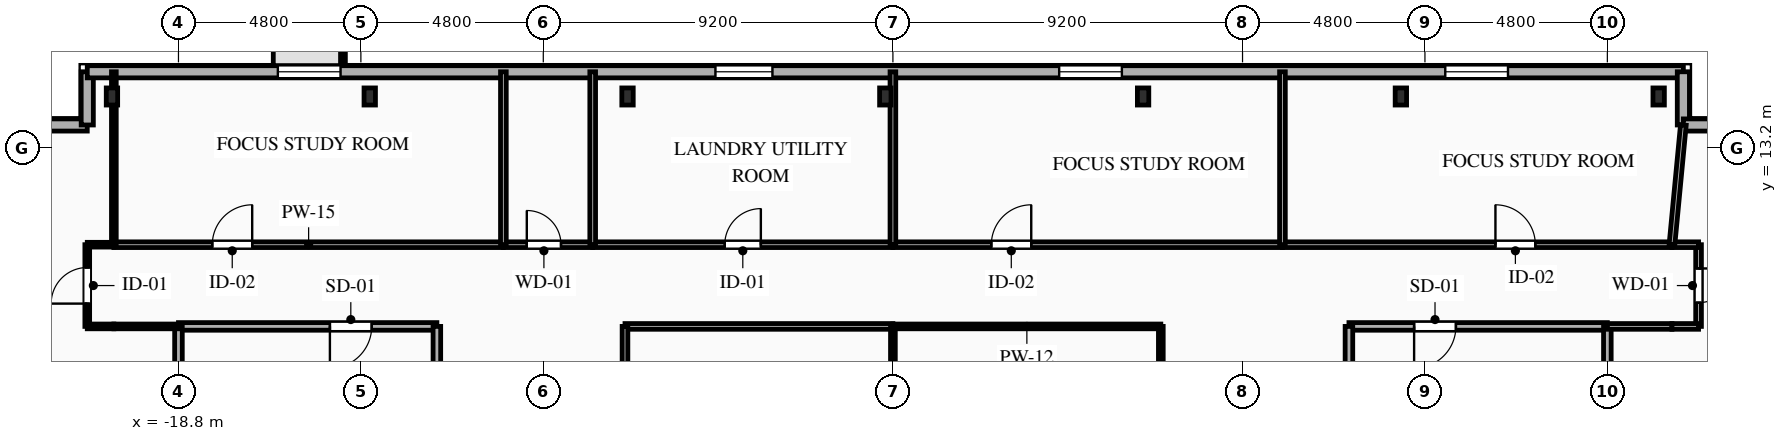
"""IFC4 building model, lengths in metres.
Left out: names, types, materials, properties, quantities, classifications, styles, units other than length and angle.
Written with IfcOpenShell. Run it as: python <this file> out.ifc"""

import sys

from ifc_helpers import new_model, si_unit, direction, frame, frame_2d, origin, origin_2d, place, context, subcontext, project, spatial, rectangle, i_section, extrude, element, fill, save


model = new_model("IFC4")
c1 = context("Model", 3, precision=1e-05, world=origin(), true_north=direction((0.0, 1.0)))
c2 = subcontext(c1, "Body", "Model", "MODEL_VIEW")
j1 = project(units=[si_unit("LENGTHUNIT", "METRE"), si_unit("PLANEANGLEUNIT", "RADIAN")], contexts=[c1])
p1 = place(None, origin())
s1 = spatial("IfcSite", under=j1, at=p1, CompositionType="ELEMENT")
p2 = place(p1, origin())
s2 = spatial("IfcBuilding", under=s1, at=p2, CompositionType="ELEMENT")
p3 = place(p2, frame((0.0, 0.0, 235.0)))
s3 = spatial("IfcBuildingStorey", under=s2, at=p3, CompositionType="ELEMENT", Elevation=235.0)
for number, where, z_axis, x_axis in (
    (1, (20.15, 14.55, 0.0), (0.0, 0.0, 1.0), (1.0, 0.0, 0.0)),
    (2, (13.367, 14.55, 0.0), (0.0, 0.0, 1.0), (1.0, 0.0, 0.0)),
    (3, (6.583, 14.55, 0.0), (0.0, 0.0, 1.0), (1.0, 0.0, 0.0)),
    (4, (-0.2, 14.55, 0.0), (0.0, 0.0, 1.0), (1.0, 0.0, 0.0)),
    (5, (-6.983, 14.55, 0.0), (0.0, 0.0, 1.0), (1.0, 0.0, 0.0)),
    (6, (-13.767, 14.55, 0.0), (0.0, 0.0, 1.0), (1.0, 0.0, 0.0)),
    (7, (-20.55, 14.55, 0.0), (0.0, 0.0, 1.0), (1.0, 0.0, 0.0)),
):
    element("IfcColumn", number, at=place(p3, frame(where, z_axis=z_axis, x_axis=x_axis)), inside=s3, PredefinedType="COLUMN", context=c2, shape_type="SweptSolid", body=[
        extrude(i_section(OverallWidth=0.3, OverallDepth=0.45, WebThickness=0.014, FlangeThickness=0.026, FilletRadius=0.027, at=origin_2d()), origin(), (0.0, 0.0, 1.0), 3.35),
    ])
p4 = place(p3, frame((-22.6, 13.8, 0.0), z_axis=(0.0, 0.0, 1.0), x_axis=(1.0, 0.0, 0.0)))
e8 = element("IfcWall", 8, at=p4, inside=s3, PredefinedType="SOLIDWALL", context=c2, shape_type="SweptSolid", body=[
    extrude(rectangle(XDim=1.4, YDim=0.32, at=frame_2d((0.7, 0.0))), origin(), (0.0, 0.0, 1.0), 3.04),
])
p5 = place(p3, frame((-21.2, 13.8, 0.0), z_axis=(0.0, 0.0, 1.0), x_axis=(0.0, 1.0, 0.0)))
e9 = element("IfcWall", 9, at=p5, inside=s3, PredefinedType="SOLIDWALL", context=c2, shape_type="SweptSolid", body=[
    extrude(rectangle(XDim=1.4, YDim=0.32, at=frame_2d((0.7, 0.0))), origin(), (0.0, 0.0, 1.0), 3.04),
])
p6 = place(p3, frame((-21.2, 15.2, 0.0), z_axis=(0.0, 0.0, 1.0), x_axis=(1.0, 0.0, 0.0)))
e10 = element("IfcWall", 10, at=p6, inside=s3, PredefinedType="SOLIDWALL", context=c2, shape_type="SweptSolid", body=[
    extrude(rectangle(XDim=42.0, YDim=0.32, at=frame_2d((21.0, 0.0))), origin(), (0.0, 0.0, 1.0), 3.04),
])
p7 = place(p6, frame((5.015, 0.0, 0.85)))
e11 = element("IfcOpeningElement", 11, at=p7, cuts=e10, PredefinedType="OPENING", context=c2, shape_type="SweptSolid", body=[
    extrude(rectangle(XDim=1.65, YDim=1.85, at=frame_2d((0.825, 0.925))), frame((0.0, 0.17, 0.0), z_axis=(0.0, -1.0, 0.0), x_axis=(1.0, 0.0, 0.0)), (0.0, 0.0, 1.0), 0.34),
])
p8 = place(p6, frame((16.53, 0.0, 0.85)))
e12 = element("IfcOpeningElement", 12, at=p8, cuts=e10, PredefinedType="OPENING", context=c2, shape_type="SweptSolid", body=[
    extrude(rectangle(XDim=1.5, YDim=1.85, at=frame_2d((0.75, 0.925))), frame((0.0, 0.17, 0.0), z_axis=(0.0, -1.0, 0.0), x_axis=(1.0, 0.0, 0.0)), (0.0, 0.0, 1.0), 0.34),
])
p9 = place(p6, frame((25.575, 0.0, 0.85)))
e13 = element("IfcOpeningElement", 13, at=p9, cuts=e10, PredefinedType="OPENING", context=c2, shape_type="SweptSolid", body=[
    extrude(rectangle(XDim=1.65, YDim=1.85, at=frame_2d((0.825, 0.925))), frame((0.0, 0.17, 0.0), z_axis=(0.0, -1.0, 0.0), x_axis=(1.0, 0.0, 0.0)), (0.0, 0.0, 1.0), 0.34),
])
p10 = place(p6, frame((35.735, 0.0, 0.85)))
e14 = element("IfcOpeningElement", 14, at=p10, cuts=e10, PredefinedType="OPENING", context=c2, shape_type="SweptSolid", body=[
    extrude(rectangle(XDim=1.65, YDim=1.85, at=frame_2d((0.825, 0.925))), frame((0.0, 0.17, 0.0), z_axis=(0.0, -1.0, 0.0), x_axis=(1.0, 0.0, 0.0)), (0.0, 0.0, 1.0), 0.34),
])
for number, where, z_axis, x_axis in (
    (15, (20.8, 15.2, 0.0), (0.0, 0.0, 1.0), (0.0, -1.0, 0.0)),
    (16, (20.8, 13.8, 0.0), (0.0, 0.0, 1.0), (1.0, 0.0, 0.0)),
):
    element("IfcWall", number, at=place(p3, frame(where, z_axis=z_axis, x_axis=x_axis)), inside=s3, PredefinedType="SOLIDWALL", context=c2, shape_type="SweptSolid", body=[
        extrude(rectangle(XDim=1.4, YDim=0.32, at=frame_2d((0.7, 0.0))), origin(), (0.0, 0.0, 1.0), 3.04),
    ])
p11 = place(p3, frame((-12.0, 8.5, 0.0), z_axis=(0.0, 0.0, 1.0), x_axis=(-1.0, 0.0, 0.0)))
e17 = element("IfcWall", 17, at=p11, inside=s3, PredefinedType="PARTITIONING", context=c2, shape_type="SweptSolid", body=[
    extrude(rectangle(XDim=6.8, YDim=0.2, at=frame_2d((3.4, 0.0))), origin(), (0.0, 0.0, 1.0), 3.04),
])
p12 = place(p11, frame((1.715, 0.0, 0.0)))
e18 = element("IfcOpeningElement", 18, at=p12, cuts=e17, PredefinedType="OPENING", context=c2, shape_type="SweptSolid", body=[
    extrude(rectangle(XDim=1.1, YDim=2.15, at=frame_2d((0.55, 1.075))), frame((0.0, 0.11, 0.0), z_axis=(0.0, -1.0, 0.0), x_axis=(1.0, 0.0, 0.0)), (0.0, 0.0, 1.0), 0.22),
])
p13 = place(p3, frame((-12.0, 5.6, 0.0), z_axis=(0.0, 0.0, 1.0), x_axis=(0.0, 1.0, 0.0)))
e19 = element("IfcWall", 19, at=p13, inside=s3, PredefinedType="PARTITIONING", context=c2, shape_type="SweptSolid", body=[
    extrude(rectangle(XDim=2.9, YDim=0.2, at=frame_2d((1.45, 0.0))), origin(), (0.0, 0.0, 1.0), 3.04),
])
p14 = place(p3, frame((-18.8, 8.5, 0.0), z_axis=(0.0, 0.0, 1.0), x_axis=(0.0, -1.0, 0.0)))
e20 = element("IfcWall", 20, at=p14, inside=s3, PredefinedType="PARTITIONING", context=c2, shape_type="SweptSolid", body=[
    extrude(rectangle(XDim=2.9, YDim=0.2, at=frame_2d((1.45, 0.0))), origin(), (0.0, 0.0, 1.0), 2.665),
])
p15 = place(p3, frame((18.8, 8.5, 0.0), z_axis=(0.0, 0.0, 1.0), x_axis=(-1.0, 0.0, 0.0)))
e21 = element("IfcWall", 21, at=p15, inside=s3, PredefinedType="PARTITIONING", context=c2, shape_type="SweptSolid", body=[
    extrude(rectangle(XDim=6.8, YDim=0.2, at=frame_2d((3.4, 0.0))), origin(), (0.0, 0.0, 1.0), 3.04),
])
p16 = place(p15, frame((3.985, 0.0, 0.0)))
e22 = element("IfcOpeningElement", 22, at=p16, cuts=e21, PredefinedType="OPENING", context=c2, shape_type="SweptSolid", body=[
    extrude(rectangle(XDim=1.1, YDim=2.15, at=frame_2d((0.55, 1.075))), frame((0.0, 0.11, 0.0), z_axis=(0.0, -1.0, 0.0), x_axis=(1.0, 0.0, 0.0)), (0.0, 0.0, 1.0), 0.22),
])
p17 = place(p3, frame((12.0, 8.5, 0.0), z_axis=(0.0, 0.0, 1.0), x_axis=(0.0, -1.0, 0.0)))
e23 = element("IfcWall", 23, at=p17, inside=s3, PredefinedType="PARTITIONING", context=c2, shape_type="SweptSolid", body=[
    extrude(rectangle(XDim=2.9, YDim=0.2, at=frame_2d((1.45, 0.0))), origin(), (0.0, 0.0, 1.0), 3.04),
])
p18 = place(p3, frame((18.8, 5.6, 0.0), z_axis=(0.0, 0.0, 1.0), x_axis=(0.0, 1.0, 0.0)))
e24 = element("IfcWall", 24, at=p18, inside=s3, PredefinedType="PARTITIONING", context=c2, shape_type="SweptSolid", body=[
    extrude(rectangle(XDim=2.9, YDim=0.2, at=frame_2d((1.45, 0.0))), origin(), (0.0, 0.0, 1.0), 2.665),
])
p19 = place(p3, frame((-21.2, 8.5, 0.0), z_axis=(0.0, 0.0, 1.0), x_axis=(0.0, 1.0, 0.0)))
e25 = element("IfcWall", 25, at=p19, inside=s3, PredefinedType="PARTITIONING", context=c2, shape_type="SweptSolid", body=[
    extrude(rectangle(XDim=2.15, YDim=0.125, at=frame_2d((1.075, 0.0))), origin(), (0.0, 0.0, 1.0), 2.695),
])
p20 = place(p19, frame((0.6, 0.0, 0.0)))
e26 = element("IfcOpeningElement", 26, at=p20, cuts=e25, PredefinedType="OPENING", context=c2, shape_type="SweptSolid", body=[
    extrude(rectangle(XDim=0.95, YDim=2.1, at=frame_2d((0.475, 1.05))), frame((0.0, 0.073, 0.0), z_axis=(0.0, -1.0, 0.0), x_axis=(1.0, 0.0, 0.0)), (0.0, 0.0, 1.0), 0.145),
])
p21 = place(p3, frame((-18.8, 8.5, 0.0), z_axis=(0.0, 0.0, 1.0), x_axis=(-1.0, 0.0, 0.0)))
e27 = element("IfcWall", 27, at=p21, inside=s3, PredefinedType="PARTITIONING", context=c2, shape_type="SweptSolid", body=[
    extrude(rectangle(XDim=1.7, YDim=0.125, at=frame_2d((0.85, 0.0))), origin(), (0.0, 0.0, 1.0), 3.04),
])
for number, where, z_axis, x_axis in (
    (28, (-20.5, 8.5, 0.0), (0.0, 0.0, 1.0), (-1.0, 0.0, 0.0)),
    (29, (-21.2, 10.65, 0.0), (0.0, 0.0, 1.0), (1.0, 0.0, 0.0)),
):
    element("IfcWall", number, at=place(p3, frame(where, z_axis=z_axis, x_axis=x_axis)), inside=s3, PredefinedType="PARTITIONING", context=c2, shape_type="SweptSolid", body=[
        extrude(rectangle(XDim=0.7, YDim=0.125, at=frame_2d((0.35, 0.0))), origin(), (0.0, 0.0, 1.0), 3.04),
    ])
p22 = place(p3, frame((-20.5, 10.65, 0.0), z_axis=(0.0, 0.0, 1.0), x_axis=(1.0, 0.0, 0.0)))
e30 = element("IfcWall", 30, at=p22, inside=s3, PredefinedType="PARTITIONING", context=c2, shape_type="SweptSolid", body=[
    extrude(rectangle(XDim=10.25, YDim=0.15, at=frame_2d((5.125, 0.0))), origin(), (0.0, 0.0, 1.0), 3.04),
])
p23 = place(p22, frame((2.59, 0.0, 0.0)))
e31 = element("IfcOpeningElement", 31, at=p23, cuts=e30, PredefinedType="OPENING", context=c2, shape_type="SweptSolid", body=[
    extrude(rectangle(XDim=1.05, YDim=2.15, at=frame_2d((0.525, 1.075))), frame((0.0, 0.085, 0.0), z_axis=(0.0, -1.0, 0.0), x_axis=(1.0, 0.0, 0.0)), (0.0, 0.0, 1.0), 0.17),
])
p24 = place(p3, frame((-10.25, 10.65, 0.0), z_axis=(0.0, 0.0, 1.0), x_axis=(1.0, 0.0, 0.0)))
e32 = element("IfcWall", 32, at=p24, inside=s3, PredefinedType="PLUMBINGWALL", context=c2, shape_type="SweptSolid", body=[
    extrude(rectangle(XDim=2.35, YDim=0.15, at=frame_2d((1.175, 0.0))), origin(), (0.0, 0.0, 1.0), 3.04),
])
p25 = place(p24, frame((0.616, 0.0, 0.0)))
e33 = element("IfcOpeningElement", 33, at=p25, cuts=e32, PredefinedType="OPENING", context=c2, shape_type="SweptSolid", body=[
    extrude(rectangle(XDim=0.9, YDim=2.1, at=frame_2d((0.45, 1.05))), frame((0.0, 0.085, 0.0), z_axis=(0.0, -1.0, 0.0), x_axis=(1.0, 0.0, 0.0)), (0.0, 0.0, 1.0), 0.17),
])
p26 = place(p3, frame((-7.9, 10.65, 0.0), z_axis=(0.0, 0.0, 1.0), x_axis=(1.0, 0.0, 0.0)))
e34 = element("IfcWall", 34, at=p26, inside=s3, PredefinedType="PARTITIONING", context=c2, shape_type="SweptSolid", body=[
    extrude(rectangle(XDim=7.9, YDim=0.15, at=frame_2d((3.95, 0.0))), origin(), (0.0, 0.0, 1.0), 3.04),
])
p27 = place(p26, frame((3.475, 0.0, 0.0)))
e35 = element("IfcOpeningElement", 35, at=p27, cuts=e34, PredefinedType="OPENING", context=c2, shape_type="SweptSolid", body=[
    extrude(rectangle(XDim=0.95, YDim=2.1, at=frame_2d((0.475, 1.05))), frame((0.0, 0.085, 0.0), z_axis=(0.0, -1.0, 0.0), x_axis=(1.0, 0.0, 0.0)), (0.0, 0.0, 1.0), 0.17),
])
p28 = place(p3, frame((0.0, 8.5, 0.0), z_axis=(0.0, 0.0, 1.0), x_axis=(-1.0, 0.0, 0.0)))
e36 = element("IfcWall", 36, at=p28, inside=s3, PredefinedType="PARTITIONING", context=c2, shape_type="SweptSolid", body=[
    extrude(rectangle(XDim=7.05, YDim=0.15, at=frame_2d((3.525, 0.0))), origin(), (0.0, 0.0, 1.0), 3.04),
])
p29 = place(p3, frame((21.2, 10.65, 0.0), z_axis=(0.0, 0.0, 1.0), x_axis=(0.0, -1.0, 0.0)))
e37 = element("IfcWall", 37, at=p29, inside=s3, PredefinedType="PARTITIONING", context=c2, shape_type="SweptSolid", body=[
    extrude(rectangle(XDim=2.15, YDim=0.15, at=frame_2d((1.075, 0.0))), origin(), (0.0, 0.0, 1.0), 3.04),
])
p30 = place(p29, frame((0.625, 0.0, 0.0)))
e38 = element("IfcOpeningElement", 38, at=p30, cuts=e37, PredefinedType="OPENING", context=c2, shape_type="SweptSolid", body=[
    extrude(rectangle(XDim=0.9, YDim=2.1, at=frame_2d((0.45, 1.05))), frame((0.0, 0.085, 0.0), z_axis=(0.0, -1.0, 0.0), x_axis=(1.0, 0.0, 0.0)), (0.0, 0.0, 1.0), 0.17),
])
p31 = place(p3, frame((20.5, 8.5, 0.0), z_axis=(0.0, 0.0, 1.0), x_axis=(-1.0, 0.0, 0.0)))
e39 = element("IfcWall", 39, at=p31, inside=s3, PredefinedType="PARTITIONING", context=c2, shape_type="SweptSolid", body=[
    extrude(rectangle(XDim=1.7, YDim=0.15, at=frame_2d((0.85, 0.0))), origin(), (0.0, 0.0, 1.0), 3.04),
])
for number, where, z_axis, x_axis in (
    (40, (20.5, 10.65, 0.0), (0.0, 0.0, 1.0), (1.0, 0.0, 0.0)),
    (41, (21.2, 8.5, 0.0), (0.0, 0.0, 1.0), (-1.0, 0.0, 0.0)),
):
    element("IfcWall", number, at=place(p3, frame(where, z_axis=z_axis, x_axis=x_axis)), inside=s3, PredefinedType="PARTITIONING", context=c2, shape_type="SweptSolid", body=[
        extrude(rectangle(XDim=0.7, YDim=0.15, at=frame_2d((0.35, 0.0))), origin(), (0.0, 0.0, 1.0), 3.04),
    ])
p32 = place(p3, frame((0.0, 10.65, 0.0), z_axis=(0.0, 0.0, 1.0), x_axis=(1.0, 0.0, 0.0)))
e42 = element("IfcWall", 42, at=p32, inside=s3, PredefinedType="PARTITIONING", context=c2, shape_type="SweptSolid", body=[
    extrude(rectangle(XDim=10.25, YDim=0.15, at=frame_2d((5.125, 0.0))), origin(), (0.0, 0.0, 1.0), 3.04),
])
p33 = place(p32, frame((2.59, 0.0, 0.0)))
e43 = element("IfcOpeningElement", 43, at=p33, cuts=e42, PredefinedType="OPENING", context=c2, shape_type="SweptSolid", body=[
    extrude(rectangle(XDim=1.05, YDim=2.15, at=frame_2d((0.525, 1.075))), frame((0.0, 0.085, 0.0), z_axis=(0.0, -1.0, 0.0), x_axis=(1.0, 0.0, 0.0)), (0.0, 0.0, 1.0), 0.17),
])
p34 = place(p3, frame((10.25, 10.65, 0.0), z_axis=(0.0, 0.0, 1.0), x_axis=(1.0, 0.0, 0.0)))
e44 = element("IfcWall", 44, at=p34, inside=s3, PredefinedType="PARTITIONING", context=c2, shape_type="SweptSolid", body=[
    extrude(rectangle(XDim=10.25, YDim=0.15, at=frame_2d((5.125, 0.0))), origin(), (0.0, 0.0, 1.0), 3.04),
])
p35 = place(p34, frame((5.605, 0.0, 0.0)))
e45 = element("IfcOpeningElement", 45, at=p35, cuts=e44, PredefinedType="OPENING", context=c2, shape_type="SweptSolid", body=[
    extrude(rectangle(XDim=1.05, YDim=2.15, at=frame_2d((0.525, 1.075))), frame((0.0, 0.085, 0.0), z_axis=(0.0, -1.0, 0.0), x_axis=(1.0, 0.0, 0.0)), (0.0, 0.0, 1.0), 0.17),
])
p36 = place(p3, frame((7.05, 8.5, 0.0), z_axis=(0.0, 0.0, 1.0), x_axis=(-1.0, 0.0, 0.0)))
e46 = element("IfcWall", 46, at=p36, inside=s3, PredefinedType="PARTITIONING", context=c2, shape_type="SweptSolid", body=[
    extrude(rectangle(XDim=7.05, YDim=0.125, at=frame_2d((3.525, 0.0))), origin(), (0.0, 0.0, 1.0), 3.04),
])
p37 = place(p3, frame((-7.05, 8.5, 0.0), z_axis=(0.0, 0.0, 1.0), x_axis=(0.0, -1.0, 0.0)))
e47 = element("IfcWall", 47, at=p37, inside=s3, PredefinedType="PARTITIONING", context=c2, shape_type="SweptSolid", body=[
    extrude(rectangle(XDim=14.1, YDim=0.15, at=frame_2d((7.05, 0.0))), origin(), (0.0, 0.0, 1.0), 3.04),
])
p38 = place(p37, frame((8.074, 0.0, 0.0)))
e48 = element("IfcOpeningElement", 48, at=p38, cuts=e47, PredefinedType="OPENING", context=c2, shape_type="SweptSolid", body=[
    extrude(rectangle(XDim=0.95, YDim=2.1, at=frame_2d((0.475, 1.05))), frame((0.0, 0.085, 0.0), z_axis=(0.0, -1.0, 0.0), x_axis=(1.0, 0.0, 0.0)), (0.0, 0.0, 1.0), 0.17),
])
p39 = place(p3, frame((7.05, -5.6, 0.0), z_axis=(0.0, 0.0, 1.0), x_axis=(0.0, 1.0, 0.0)))
e49 = element("IfcWall", 49, at=p39, inside=s3, PredefinedType="PARTITIONING", context=c2, shape_type="SweptSolid", body=[
    extrude(rectangle(XDim=14.1, YDim=0.125, at=frame_2d((7.05, 0.0))), origin(), (0.0, 0.0, 1.0), 3.04),
])
p40 = place(p39, frame((5.076, 0.0, 0.0)))
e50 = element("IfcOpeningElement", 50, at=p40, cuts=e49, PredefinedType="OPENING", context=c2, shape_type="SweptSolid", body=[
    extrude(rectangle(XDim=0.95, YDim=2.1, at=frame_2d((0.475, 1.05))), frame((0.0, 0.073, 0.0), z_axis=(0.0, -1.0, 0.0), x_axis=(1.0, 0.0, 0.0)), (0.0, 0.0, 1.0), 0.145),
])
p41 = place(p3, frame((-20.5, 15.2, 0.0), z_axis=(0.0, 0.0, 1.0), x_axis=(0.0, -1.0, 0.0)))
e51 = element("IfcWall", 51, at=p41, inside=s3, PredefinedType="PARTITIONING", context=c2, shape_type="SweptSolid", body=[
    extrude(rectangle(XDim=4.55, YDim=0.125, at=frame_2d((2.275, 0.0))), origin(), (0.0, 0.0, 1.0), 2.665),
])
p42 = place(p3, frame((20.5, 10.65, 0.0), z_axis=(0.0, 0.0, 1.0), x_axis=(0.094820015289, 0.99549443228, 0.0)))
e52 = element("IfcWall", 52, at=p42, inside=s3, PredefinedType="PARTITIONING", context=c2, shape_type="SweptSolid", body=[
    extrude(rectangle(XDim=3.164, YDim=0.15, at=frame_2d((1.582, 0.0))), origin(), (0.0, 0.0, 1.0), 3.04),
])
p43 = place(p3, frame((-10.25, 15.2, 0.0), z_axis=(0.0, 0.0, 1.0), x_axis=(0.0, -1.0, 0.0)))
e53 = element("IfcWall", 53, at=p43, inside=s3, PredefinedType="PLUMBINGWALL", context=c2, shape_type="SweptSolid", body=[
    extrude(rectangle(XDim=4.55, YDim=0.15, at=frame_2d((2.275, 0.0))), origin(), (0.0, 0.0, 1.0), 3.04),
])
p44 = place(p3, frame((-7.9, 15.2, 0.0), z_axis=(0.0, 0.0, 1.0), x_axis=(0.0, -1.0, 0.0)))
e54 = element("IfcWall", 54, at=p44, inside=s3, PredefinedType="PLUMBINGWALL", context=c2, shape_type="SweptSolid", body=[
    extrude(rectangle(XDim=4.55, YDim=0.15, at=frame_2d((2.275, 0.0))), origin(), (0.0, 0.0, 1.0), 2.665),
])
for number, where, z_axis, x_axis in (
    (55, (0.0, 15.2, 0.0), (0.0, 0.0, 1.0), (0.0, -1.0, 0.0)),
    (56, (10.25, 15.2, 0.0), (0.0, 0.0, 1.0), (0.0, -1.0, 0.0)),
):
    element("IfcWall", number, at=place(p3, frame(where, z_axis=z_axis, x_axis=x_axis)), inside=s3, PredefinedType="PARTITIONING", context=c2, shape_type="SweptSolid", body=[
        extrude(rectangle(XDim=4.55, YDim=0.15, at=frame_2d((2.275, 0.0))), origin(), (0.0, 0.0, 1.0), 3.04),
    ])
p45 = place(p3, frame((0.0, 8.5, 0.0), z_axis=(0.0, 0.0, 1.0), x_axis=(0.0, -1.0, 0.0)))
e57 = element("IfcWall", 57, at=p45, inside=s3, PredefinedType="PARTITIONING", context=c2, shape_type="SweptSolid", body=[
    extrude(rectangle(XDim=14.1, YDim=0.125, at=frame_2d((7.05, 0.0))), origin(), (0.0, 0.0, 1.0), 3.04),
])
p46 = place(p7, origin())
e58 = element("IfcWindow", 58, at=p46, inside=s3, PartitioningType="SINGLE_PANEL", PredefinedType="WINDOW", context=c2, shape_type="SweptSolid", body=[
    extrude(rectangle(XDim=1.65, YDim=1.85, at=frame_2d((0.825, 0.925))), frame((0.0, 0.03, 0.0), z_axis=(0.0, -1.0, 0.0), x_axis=(1.0, 0.0, 0.0)), (0.0, 0.0, 1.0), 0.06),
])
fill(e11, e58)
p47 = place(p8, origin())
e59 = element("IfcWindow", 59, at=p47, inside=s3, PartitioningType="SINGLE_PANEL", PredefinedType="WINDOW", context=c2, shape_type="SweptSolid", body=[
    extrude(rectangle(XDim=1.5, YDim=1.85, at=frame_2d((0.75, 0.925))), frame((0.0, 0.03, 0.0), z_axis=(0.0, -1.0, 0.0), x_axis=(1.0, 0.0, 0.0)), (0.0, 0.0, 1.0), 0.06),
])
fill(e12, e59)
p48 = place(p9, origin())
e60 = element("IfcWindow", 60, at=p48, inside=s3, PartitioningType="SINGLE_PANEL", PredefinedType="WINDOW", context=c2, shape_type="SweptSolid", body=[
    extrude(rectangle(XDim=1.65, YDim=1.85, at=frame_2d((0.825, 0.925))), frame((0.0, 0.03, 0.0), z_axis=(0.0, -1.0, 0.0), x_axis=(1.0, 0.0, 0.0)), (0.0, 0.0, 1.0), 0.06),
])
fill(e13, e60)
p49 = place(p10, origin())
e61 = element("IfcWindow", 61, at=p49, inside=s3, PartitioningType="SINGLE_PANEL", PredefinedType="WINDOW", context=c2, shape_type="SweptSolid", body=[
    extrude(rectangle(XDim=1.65, YDim=1.85, at=frame_2d((0.825, 0.925))), frame((0.0, 0.03, 0.0), z_axis=(0.0, -1.0, 0.0), x_axis=(1.0, 0.0, 0.0)), (0.0, 0.0, 1.0), 0.06),
])
fill(e14, e61)
p50 = place(p12, origin())
e62 = element("IfcDoor", 62, at=p50, inside=s3, OperationType="SINGLE_SWING_RIGHT", PredefinedType="DOOR", context=c2, shape_type="SweptSolid", body=[
    extrude(rectangle(XDim=1.1, YDim=2.15, at=frame_2d((0.55, 1.075))), frame((0.0, 0.025, 0.0), z_axis=(0.0, -1.0, 0.0), x_axis=(1.0, 0.0, 0.0)), (0.0, 0.0, 1.0), 0.05),
])
fill(e18, e62)
p51 = place(p16, origin())
e63 = element("IfcDoor", 63, at=p51, inside=s3, OperationType="SINGLE_SWING_RIGHT", PredefinedType="DOOR", context=c2, shape_type="SweptSolid", body=[
    extrude(rectangle(XDim=1.1, YDim=2.15, at=frame_2d((0.55, 1.075))), frame((0.0, 0.025, 0.0), z_axis=(0.0, -1.0, 0.0), x_axis=(1.0, 0.0, 0.0)), (0.0, 0.0, 1.0), 0.05),
])
fill(e22, e63)
p52 = place(p20, origin())
e64 = element("IfcDoor", 64, at=p52, inside=s3, OperationType="SINGLE_SWING_LEFT", PredefinedType="DOOR", context=c2, shape_type="SweptSolid", body=[
    extrude(rectangle(XDim=0.95, YDim=2.1, at=frame_2d((0.475, 1.05))), frame((0.0, 0.025, 0.0), z_axis=(0.0, -1.0, 0.0), x_axis=(1.0, 0.0, 0.0)), (0.0, 0.0, 1.0), 0.05),
])
fill(e26, e64)
p53 = place(p23, origin())
e65 = element("IfcDoor", 65, at=p53, inside=s3, OperationType="SINGLE_SWING_RIGHT", PredefinedType="DOOR", context=c2, shape_type="SweptSolid", body=[
    extrude(rectangle(XDim=1.05, YDim=2.15, at=frame_2d((0.525, 1.075))), frame((0.0, 0.025, 0.0), z_axis=(0.0, -1.0, 0.0), x_axis=(1.0, 0.0, 0.0)), (0.0, 0.0, 1.0), 0.05),
])
fill(e31, e65)
p54 = place(p25, origin())
e66 = element("IfcDoor", 66, at=p54, inside=s3, OperationType="SINGLE_SWING_LEFT", PredefinedType="DOOR", context=c2, shape_type="SweptSolid", body=[
    extrude(rectangle(XDim=0.9, YDim=2.1, at=frame_2d((0.45, 1.05))), frame((0.0, 0.025, 0.0), z_axis=(0.0, -1.0, 0.0), x_axis=(1.0, 0.0, 0.0)), (0.0, 0.0, 1.0), 0.05),
])
fill(e33, e66)
p55 = place(p27, origin())
e67 = element("IfcDoor", 67, at=p55, inside=s3, OperationType="SINGLE_SWING_RIGHT", PredefinedType="DOOR", context=c2, shape_type="SweptSolid", body=[
    extrude(rectangle(XDim=0.95, YDim=2.1, at=frame_2d((0.475, 1.05))), frame((0.0, 0.025, 0.0), z_axis=(0.0, -1.0, 0.0), x_axis=(1.0, 0.0, 0.0)), (0.0, 0.0, 1.0), 0.05),
])
fill(e35, e67)
p56 = place(p30, origin())
e68 = element("IfcDoor", 68, at=p56, inside=s3, OperationType="SINGLE_SWING_LEFT", PredefinedType="DOOR", context=c2, shape_type="SweptSolid", body=[
    extrude(rectangle(XDim=0.9, YDim=2.1, at=frame_2d((0.45, 1.05))), frame((0.0, 0.025, 0.0), z_axis=(0.0, -1.0, 0.0), x_axis=(1.0, 0.0, 0.0)), (0.0, 0.0, 1.0), 0.05),
])
fill(e38, e68)
p57 = place(p33, origin())
e69 = element("IfcDoor", 69, at=p57, inside=s3, OperationType="SINGLE_SWING_RIGHT", PredefinedType="DOOR", context=c2, shape_type="SweptSolid", body=[
    extrude(rectangle(XDim=1.05, YDim=2.15, at=frame_2d((0.525, 1.075))), frame((0.0, 0.025, 0.0), z_axis=(0.0, -1.0, 0.0), x_axis=(1.0, 0.0, 0.0)), (0.0, 0.0, 1.0), 0.05),
])
fill(e43, e69)
p58 = place(p35, origin())
e70 = element("IfcDoor", 70, at=p58, inside=s3, OperationType="SINGLE_SWING_LEFT", PredefinedType="DOOR", context=c2, shape_type="SweptSolid", body=[
    extrude(rectangle(XDim=1.05, YDim=2.15, at=frame_2d((0.525, 1.075))), frame((0.0, 0.025, 0.0), z_axis=(0.0, -1.0, 0.0), x_axis=(1.0, 0.0, 0.0)), (0.0, 0.0, 1.0), 0.05),
])
fill(e45, e70)
save(model, sys.argv[1])
